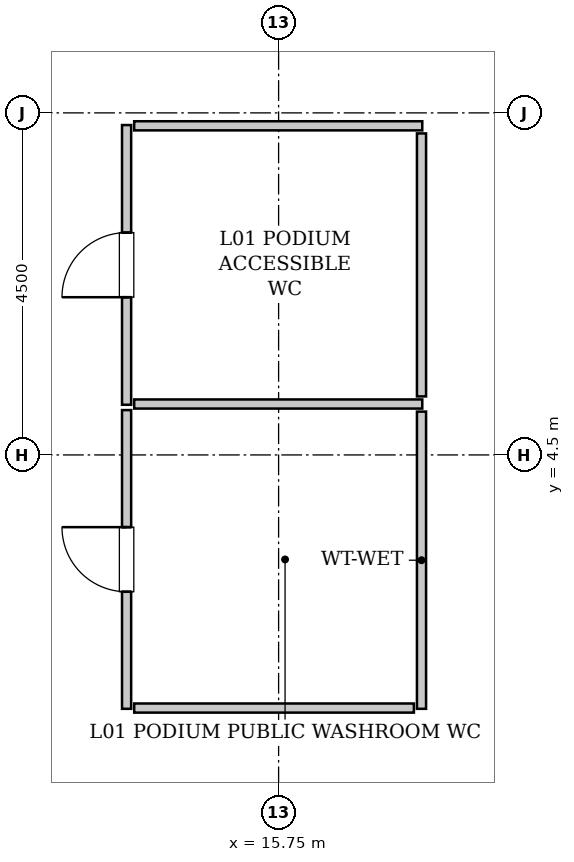
"""IFC4 building model, lengths in metres.
Left out: names, types, materials, properties, quantities, classifications, styles, units other than length and angle.
Written with IfcOpenShell. Run it as: python <this file> out.ifc"""

import sys

from ifc_helpers import new_model, si_unit, direction, frame, frame_2d, origin, place, context, subcontext, project, spatial, rectangle, extrude, source, transform, mapped, element, fill, save


model = new_model("IFC4")
c1 = context("Model", 3, precision=1e-05, world=origin(), true_north=direction((0.0, 1.0)))
c2 = subcontext(c1, "Body", "Model", "MODEL_VIEW")
j1 = project(units=[si_unit("LENGTHUNIT", "METRE"), si_unit("PLANEANGLEUNIT", "RADIAN")], contexts=[c1])
p1 = place(None, origin())
s1 = spatial("IfcSite", under=j1, at=p1, CompositionType="ELEMENT")
p2 = place(p1, origin())
s2 = spatial("IfcBuilding", under=s1, at=p2, CompositionType="ELEMENT")
p3 = place(p2, frame((0.0, 0.0, 6.0)))
s3 = spatial("IfcBuildingStorey", under=s2, at=p3, CompositionType="ELEMENT", Elevation=6.0)
m1 = source(origin(), c2, "Body", "SweptSolid", [
    extrude(rectangle(XDim=3.68, YDim=0.12, at=frame_2d((1.84, 0.0))), origin(), (0.0, 0.0, 1.0), 5.085),
])
p4 = place(p3, frame((13.75, 5.16, 0.0), z_axis=(0.0, 0.0, 1.0), x_axis=(0.0, 1.0, 0.0)))
e1 = element("IfcWall", 1, at=p4, inside=s3, PredefinedType="PLUMBINGWALL", context=c2, shape_type="MappedRepresentation", body=[
    mapped(m1, transform((0.0, 0.0, 0.0), x_axis=(1.0, 0.0, 0.0), y_axis=(0.0, 1.0, 0.0), z_axis=(0.0, 0.0, 1.0), scale=1.0)),
])
p5 = place(p4, frame((1.415, 0.0, 0.0)))
e2 = element("IfcOpeningElement", 2, at=p5, cuts=e1, PredefinedType="OPENING", context=c2, shape_type="SweptSolid", body=[
    extrude(rectangle(XDim=0.85, YDim=2.1, at=frame_2d((0.425, 1.05))), frame((0.0, 0.07, 0.0), z_axis=(0.0, -1.0, 0.0), x_axis=(1.0, 0.0, 0.0)), (0.0, 0.0, 1.0), 0.14),
])
m2 = source(origin(), c2, "Body", "SweptSolid", [
    extrude(rectangle(XDim=3.79, YDim=0.12, at=frame_2d((1.895, 0.0))), origin(), (0.0, 0.0, 1.0), 5.085),
])
p6 = place(p3, frame((13.85, 5.17, 0.0), z_axis=(0.0, 0.0, 1.0), x_axis=(1.0, 0.0, 0.0)))
e3 = element("IfcWall", 3, at=p6, inside=s3, PredefinedType="PLUMBINGWALL", context=c2, shape_type="MappedRepresentation", body=[
    mapped(m2, transform((0.0, 0.0, 0.0), x_axis=(1.0, 0.0, 0.0), y_axis=(0.0, 1.0, 0.0), z_axis=(0.0, 0.0, 1.0), scale=1.0)),
])
m3 = source(origin(), c2, "Body", "SweptSolid", [
    extrude(rectangle(XDim=3.79, YDim=0.12, at=frame_2d((1.895, 0.0))), origin(), (0.0, 0.0, 1.0), 4.075),
])
p7 = place(p3, frame((13.85, 8.83, 0.0), z_axis=(0.0, 0.0, 1.0), x_axis=(1.0, 0.0, 0.0)))
e4 = element("IfcWall", 4, at=p7, inside=s3, PredefinedType="PLUMBINGWALL", context=c2, shape_type="MappedRepresentation", body=[
    mapped(m3, transform((0.0, 0.0, 0.0), x_axis=(1.0, 0.0, 0.0), y_axis=(0.0, 1.0, 0.0), z_axis=(0.0, 0.0, 1.0), scale=1.0)),
])
m4 = source(origin(), c2, "Body", "SweptSolid", [
    extrude(rectangle(XDim=3.46, YDim=0.12, at=frame_2d((1.73, 0.0))), origin(), (0.0, 0.0, 1.0), 4.625),
])
p8 = place(p3, frame((17.63, 5.27, 0.0), z_axis=(0.0, 0.0, 1.0), x_axis=(0.0, 1.0, 0.0)))
e5 = element("IfcWall", 5, at=p8, inside=s3, PredefinedType="PLUMBINGWALL", context=c2, shape_type="MappedRepresentation", body=[
    mapped(m4, transform((0.0, 0.0, 0.0), x_axis=(1.0, 0.0, 0.0), y_axis=(0.0, 1.0, 0.0), z_axis=(0.0, 0.0, 1.0), scale=1.0)),
])
m5 = source(origin(), c2, "Body", "SweptSolid", [
    extrude(rectangle(XDim=3.93, YDim=0.12, at=frame_2d((1.965, 0.0))), origin(), (0.0, 0.0, 1.0), 5.085),
])
p9 = place(p3, frame((13.75, 1.16, 0.0), z_axis=(0.0, 0.0, 1.0), x_axis=(0.0, 1.0, 0.0)))
e6 = element("IfcWall", 6, at=p9, inside=s3, PredefinedType="PLUMBINGWALL", context=c2, shape_type="MappedRepresentation", body=[
    mapped(m5, transform((0.0, 0.0, 0.0), x_axis=(1.0, 0.0, 0.0), y_axis=(0.0, 1.0, 0.0), z_axis=(0.0, 0.0, 1.0), scale=1.0)),
])
p10 = place(p9, frame((1.54, 0.0, 0.0)))
e7 = element("IfcOpeningElement", 7, at=p10, cuts=e6, PredefinedType="OPENING", context=c2, shape_type="SweptSolid", body=[
    extrude(rectangle(XDim=0.85, YDim=2.1, at=frame_2d((0.425, 1.05))), frame((0.0, 0.07, 0.0), z_axis=(0.0, -1.0, 0.0), x_axis=(1.0, 0.0, 0.0)), (0.0, 0.0, 1.0), 0.14),
])
m6 = source(origin(), c2, "Body", "SweptSolid", [
    extrude(rectangle(XDim=3.91, YDim=0.12, at=frame_2d((1.955, 0.0))), origin(), (0.0, 0.0, 1.0), 4.625),
])
p11 = place(p3, frame((17.63, 1.16, 0.0), z_axis=(0.0, 0.0, 1.0), x_axis=(0.0, 1.0, 0.0)))
e8 = element("IfcWall", 8, at=p11, inside=s3, PredefinedType="PLUMBINGWALL", context=c2, shape_type="MappedRepresentation", body=[
    mapped(m6, transform((0.0, 0.0, 0.0), x_axis=(1.0, 0.0, 0.0), y_axis=(0.0, 1.0, 0.0), z_axis=(0.0, 0.0, 1.0), scale=1.0)),
])
m7 = source(origin(), c2, "Body", "SweptSolid", [
    extrude(rectangle(XDim=3.68, YDim=0.12, at=frame_2d((1.84, 0.0))), origin(), (0.0, 0.0, 1.0), 5.085),
])
p12 = place(p3, frame((13.85, 1.17, 0.0), z_axis=(0.0, 0.0, 1.0), x_axis=(1.0, 0.0, 0.0)))
e9 = element("IfcWall", 9, at=p12, inside=s3, PredefinedType="PLUMBINGWALL", context=c2, shape_type="MappedRepresentation", body=[
    mapped(m7, transform((0.0, 0.0, 0.0), x_axis=(1.0, 0.0, 0.0), y_axis=(0.0, 1.0, 0.0), z_axis=(0.0, 0.0, 1.0), scale=1.0)),
])
m8 = source(origin(), c2, "Body", "SweptSolid", [
    extrude(rectangle(XDim=0.85, YDim=2.1, at=frame_2d((0.425, 1.05))), frame((0.0, 0.025, 0.0), z_axis=(0.0, -1.0, 0.0), x_axis=(1.0, 0.0, 0.0)), (0.0, 0.0, 1.0), 0.05),
])
p13 = place(p5, origin())
e10 = element("IfcDoor", 10, at=p13, inside=s3, OperationType="SINGLE_SWING_LEFT", PredefinedType="DOOR", context=c2, shape_type="MappedRepresentation", body=[
    mapped(m8, transform((0.0, 0.0, 0.0), x_axis=(1.0, 0.0, 0.0), y_axis=(0.0, 1.0, 0.0), z_axis=(0.0, 0.0, 1.0), scale=1.0)),
])
fill(e2, e10)
p14 = place(p10, origin())
e11 = element("IfcDoor", 11, at=p14, inside=s3, OperationType="SINGLE_SWING_RIGHT", PredefinedType="DOOR", context=c2, shape_type="MappedRepresentation", body=[
    mapped(m8, transform((0.0, 0.0, 0.0), x_axis=(1.0, 0.0, 0.0), y_axis=(0.0, 1.0, 0.0), z_axis=(0.0, 0.0, 1.0), scale=1.0)),
])
fill(e7, e11)
save(model, sys.argv[1])
